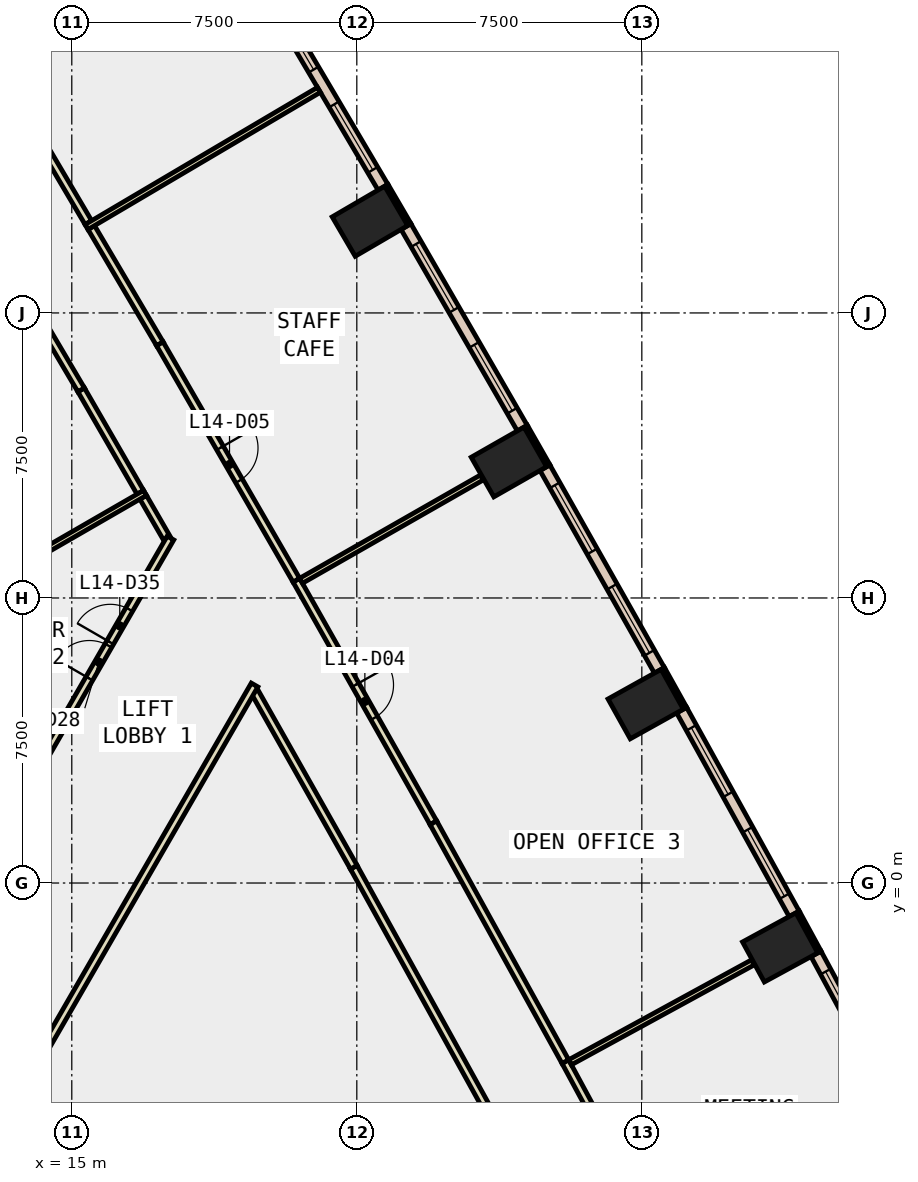
"""IFC4 building model, lengths in metres.
Left out: names, types, materials, properties, quantities, classifications, styles, units other than length and angle.
Written with IfcOpenShell. Run it as: python <this file> out.ifc"""

import sys

from ifc_helpers import new_model, si_unit, direction, frame, frame_2d, origin, origin_2d, place, context, subcontext, project, spatial, rectangle, extrude, element, fill, save


model = new_model("IFC4")
c1 = context("Model", 3, precision=1e-05, world=origin(), true_north=direction((0.0, 1.0)))
c2 = subcontext(c1, "Body", "Model", "MODEL_VIEW")
j1 = project(units=[si_unit("LENGTHUNIT", "METRE"), si_unit("PLANEANGLEUNIT", "RADIAN")], contexts=[c1])
p1 = place(None, origin())
s1 = spatial("IfcSite", under=j1, at=p1, CompositionType="ELEMENT")
p2 = place(p1, origin())
s2 = spatial("IfcBuilding", under=s1, at=p2, CompositionType="ELEMENT")
p3 = place(p2, frame((0.0, 0.0, 68.6)))
s3 = spatial("IfcBuildingStorey", under=s2, at=p3, CompositionType="ELEMENT", Elevation=68.6)
for number, where, z_axis, x_axis in (
    (1, (33.64, -1.695, -0.4), (0.0, 0.0, 1.0), (-0.478, 0.878, 0.0)),
    (2, (30.102, 4.708, -0.4), (0.0, 0.0, 1.0), (-0.487, 0.873, 0.0)),
    (3, (26.503, 11.078, -0.4), (0.0, 0.0, 1.0), (-0.496, 0.869, 0.0)),
    (4, (22.846, 17.413, -0.4), (0.0, 0.0, 1.0), (-0.504, 0.864, 0.0)),
):
    element("IfcColumn", number, at=place(p3, frame(where, z_axis=z_axis, x_axis=x_axis)), inside=s3, PredefinedType="COLUMN", context=c2, shape_type="SweptSolid", body=[
        extrude(rectangle(XDim=1.2, YDim=1.6, at=origin_2d()), origin(), (0.0, 0.0, 1.0), 4.2),
    ])
p4 = place(p3, frame((9.31, -5.375, -0.4), z_axis=(0.0, 0.0, 1.0), x_axis=(0.866017533419, -0.500013631625, 0.0)))
e5 = element("IfcWall", 5, at=p4, inside=s3, PredefinedType="SHEAR", context=c2, shape_type="SweptSolid", body=[
    extrude(rectangle(XDim=9.0, YDim=0.8, at=frame_2d((4.5, 0.0))), origin(), (0.0, 0.0, 1.0), 4.2),
])
p5 = place(p3, frame((34.673, -1.816, 0.0), z_axis=(0.0, 0.0, 1.0), x_axis=(-0.478267644701, 0.878214131082, 0.0)))
e6 = element("IfcWall", 6, at=p5, inside=s3, PredefinedType="STANDARD", context=c2, shape_type="SweptSolid", body=[
    extrude(rectangle(XDim=1.2, YDim=0.1, at=frame_2d((0.6, 0.0))), origin(), (0.0, 0.0, 1.0), 3.8),
])
p6 = place(p3, frame((31.136, 4.598, 0.0), z_axis=(0.0, 0.0, 1.0), x_axis=(-0.486730996044, 0.87355190887, 0.0)))
e7 = element("IfcWall", 7, at=p6, inside=s3, PredefinedType="STANDARD", context=c2, shape_type="SweptSolid", body=[
    extrude(rectangle(XDim=1.2, YDim=0.1, at=frame_2d((0.6, 0.0))), origin(), (0.0, 0.0, 1.0), 3.8),
])
p7 = place(p3, frame((27.539, 10.978, 0.0), z_axis=(0.0, 0.0, 1.0), x_axis=(-0.495854054996, 0.868405870629, 0.0)))
e8 = element("IfcWall", 8, at=p7, inside=s3, PredefinedType="STANDARD", context=c2, shape_type="SweptSolid", body=[
    extrude(rectangle(XDim=1.2, YDim=0.1, at=frame_2d((0.6, 0.0))), origin(), (0.0, 0.0, 1.0), 3.8),
])
p8 = place(p3, frame((23.882, 17.324, 0.0), z_axis=(0.0, 0.0, 1.0), x_axis=(-0.504225229382, 0.863572184623, 0.0)))
e9 = element("IfcWall", 9, at=p8, inside=s3, PredefinedType="STANDARD", context=c2, shape_type="SweptSolid", body=[
    extrude(rectangle(XDim=1.2, YDim=0.1, at=frame_2d((0.6, 0.0))), origin(), (0.0, 0.0, 1.0), 3.8),
])
p9 = place(p3, frame((37.495, -7.253, 0.0), z_axis=(0.0, 0.0, 1.0), x_axis=(-0.475413659872, 0.879762383833, 0.0)))
e10 = element("IfcWall", 10, at=p9, inside=s3, PredefinedType="STANDARD", context=c2, shape_type="SweptSolid", body=[
    extrude(rectangle(XDim=6.125, YDim=0.3, at=frame_2d((3.063, 0.0))), origin(), (0.0, 0.0, 1.0), 3.8),
])
p10 = place(p9, frame((0.531, 0.0, 0.9)))
e11 = element("IfcOpeningElement", 11, at=p10, cuts=e10, PredefinedType="OPENING", context=c2, shape_type="SweptSolid", body=[
    extrude(rectangle(XDim=2.0, YDim=2.6, at=frame_2d((1.0, 1.3))), frame((0.0, 0.16, 0.0), z_axis=(0.0, -1.0, 0.0), x_axis=(1.0, 0.0, 0.0)), (0.0, 0.0, 1.0), 0.32),
])
p11 = place(p9, frame((3.594, 0.0, 0.9)))
e12 = element("IfcOpeningElement", 12, at=p11, cuts=e10, PredefinedType="OPENING", context=c2, shape_type="SweptSolid", body=[
    extrude(rectangle(XDim=2.0, YDim=2.6, at=frame_2d((1.0, 1.3))), frame((0.0, 0.16, 0.0), z_axis=(0.0, -1.0, 0.0), x_axis=(1.0, 0.0, 0.0)), (0.0, 0.0, 1.0), 0.32),
])
p12 = place(p3, frame((34.009, -0.812, 0.0), z_axis=(0.0, 0.0, 1.0), x_axis=(-0.483587271547, 0.875296150339, 0.0)))
e13 = element("IfcWall", 13, at=p12, inside=s3, PredefinedType="STANDARD", context=c2, shape_type="SweptSolid", body=[
    extrude(rectangle(XDim=6.125, YDim=0.3, at=frame_2d((3.062, 0.0))), origin(), (0.0, 0.0, 1.0), 3.8),
])
p13 = place(p12, frame((0.531, 0.0, 0.9)))
e14 = element("IfcOpeningElement", 14, at=p13, cuts=e13, PredefinedType="OPENING", context=c2, shape_type="SweptSolid", body=[
    extrude(rectangle(XDim=2.0, YDim=2.6, at=frame_2d((1.0, 1.3))), frame((0.0, 0.16, 0.0), z_axis=(0.0, -1.0, 0.0), x_axis=(1.0, 0.0, 0.0)), (0.0, 0.0, 1.0), 0.32),
])
p14 = place(p12, frame((3.594, 0.0, 0.9)))
e15 = element("IfcOpeningElement", 15, at=p14, cuts=e13, PredefinedType="OPENING", context=c2, shape_type="SweptSolid", body=[
    extrude(rectangle(XDim=2.0, YDim=2.6, at=frame_2d((1.0, 1.3))), frame((0.0, 0.16, 0.0), z_axis=(0.0, -1.0, 0.0), x_axis=(1.0, 0.0, 0.0)), (0.0, 0.0, 1.0), 0.32),
])
p15 = place(p3, frame((30.462, 5.595, 0.0), z_axis=(0.0, 0.0, 1.0), x_axis=(-0.491887822214, 0.870658584267, 0.0)))
e16 = element("IfcWall", 16, at=p15, inside=s3, PredefinedType="STANDARD", context=c2, shape_type="SweptSolid", body=[
    extrude(rectangle(XDim=6.125, YDim=0.3, at=frame_2d((3.062, 0.0))), origin(), (0.0, 0.0, 1.0), 3.8),
])
p16 = place(p15, frame((0.531, 0.0, 0.9)))
e17 = element("IfcOpeningElement", 17, at=p16, cuts=e16, PredefinedType="OPENING", context=c2, shape_type="SweptSolid", body=[
    extrude(rectangle(XDim=2.0, YDim=2.6, at=frame_2d((1.0, 1.3))), frame((0.0, 0.16, 0.0), z_axis=(0.0, -1.0, 0.0), x_axis=(1.0, 0.0, 0.0)), (0.0, 0.0, 1.0), 0.32),
])
p17 = place(p15, frame((3.594, 0.0, 0.9)))
e18 = element("IfcOpeningElement", 18, at=p17, cuts=e16, PredefinedType="OPENING", context=c2, shape_type="SweptSolid", body=[
    extrude(rectangle(XDim=2.0, YDim=2.6, at=frame_2d((1.0, 1.3))), frame((0.0, 0.16, 0.0), z_axis=(0.0, -1.0, 0.0), x_axis=(1.0, 0.0, 0.0)), (0.0, 0.0, 1.0), 0.32),
])
p18 = place(p3, frame((26.855, 11.968, 0.0), z_axis=(0.0, 0.0, 1.0), x_axis=(-0.499903021601, 0.86608138705, 0.0)))
e19 = element("IfcWall", 19, at=p18, inside=s3, PredefinedType="STANDARD", context=c2, shape_type="SweptSolid", body=[
    extrude(rectangle(XDim=6.125, YDim=0.3, at=frame_2d((3.062, 0.0))), origin(), (0.0, 0.0, 1.0), 3.8),
])
p19 = place(p18, frame((0.531, 0.0, 0.9)))
e20 = element("IfcOpeningElement", 20, at=p19, cuts=e19, PredefinedType="OPENING", context=c2, shape_type="SweptSolid", body=[
    extrude(rectangle(XDim=2.0, YDim=2.6, at=frame_2d((1.0, 1.3))), frame((0.0, 0.16, 0.0), z_axis=(0.0, -1.0, 0.0), x_axis=(1.0, 0.0, 0.0)), (0.0, 0.0, 1.0), 0.32),
])
p20 = place(p18, frame((3.594, 0.0, 0.9)))
e21 = element("IfcOpeningElement", 21, at=p20, cuts=e19, PredefinedType="OPENING", context=c2, shape_type="SweptSolid", body=[
    extrude(rectangle(XDim=2.0, YDim=2.6, at=frame_2d((1.0, 1.3))), frame((0.0, 0.16, 0.0), z_axis=(0.0, -1.0, 0.0), x_axis=(1.0, 0.0, 0.0)), (0.0, 0.0, 1.0), 0.32),
])
p21 = place(p3, frame((23.189, 18.307, 0.0), z_axis=(0.0, 0.0, 1.0), x_axis=(-0.508163938648, 0.861260362177, 0.0)))
e22 = element("IfcWall", 22, at=p21, inside=s3, PredefinedType="STANDARD", context=c2, shape_type="SweptSolid", body=[
    extrude(rectangle(XDim=6.126, YDim=0.3, at=frame_2d((3.063, 0.0))), origin(), (0.0, 0.0, 1.0), 3.8),
])
p22 = place(p21, frame((0.531, 0.0, 0.9)))
e23 = element("IfcOpeningElement", 23, at=p22, cuts=e22, PredefinedType="OPENING", context=c2, shape_type="SweptSolid", body=[
    extrude(rectangle(XDim=2.0, YDim=2.6, at=frame_2d((1.0, 1.3))), frame((0.0, 0.16, 0.0), z_axis=(0.0, -1.0, 0.0), x_axis=(1.0, 0.0, 0.0)), (0.0, 0.0, 1.0), 0.32),
])
p23 = place(p21, frame((3.594, 0.0, 0.9)))
e24 = element("IfcOpeningElement", 24, at=p23, cuts=e22, PredefinedType="OPENING", context=c2, shape_type="SweptSolid", body=[
    extrude(rectangle(XDim=2.0, YDim=2.6, at=frame_2d((1.0, 1.3))), frame((0.0, 0.16, 0.0), z_axis=(0.0, -1.0, 0.0), x_axis=(1.0, 0.0, 0.0)), (0.0, 0.0, 1.0), 0.32),
])
p24 = place(p3, frame((17.497, 9.078, 0.0), z_axis=(0.0, 0.0, 1.0), x_axis=(-0.500126451326, 0.865952384768, 0.0)))
e25 = element("IfcWall", 25, at=p24, inside=s3, PredefinedType="PARTITIONING", context=c2, shape_type="SweptSolid", body=[
    extrude(rectangle(XDim=1.238, YDim=0.2, at=frame_2d((0.619, 0.0))), origin(), (0.0, 0.0, 1.0), 3.8),
])
p25 = place(p3, frame((16.803, 10.28, 0.0), z_axis=(0.0, 0.0, 1.0), x_axis=(-0.499941881293, 0.866058956036, 0.0)))
e26 = element("IfcWall", 26, at=p25, inside=s3, PredefinedType="PARTITIONING", context=c2, shape_type="SweptSolid", body=[
    extrude(rectangle(XDim=3.114, YDim=0.2, at=frame_2d((1.557, 0.0))), origin(), (0.0, 0.0, 1.0), 3.8),
])
p26 = place(p3, frame((15.246, 12.977, 0.0), z_axis=(0.0, 0.0, 1.0), x_axis=(-0.508473864329, 0.861077423519, 0.0)))
e27 = element("IfcWall", 27, at=p26, inside=s3, PredefinedType="PARTITIONING", context=c2, shape_type="SweptSolid", body=[
    extrude(rectangle(XDim=1.9, YDim=0.2, at=frame_2d((0.95, 0.0))), origin(), (0.0, 0.0, 1.0), 3.8),
])
p27 = place(p3, frame((25.918, -5.916, 0.0), z_axis=(0.0, 0.0, 1.0), x_axis=(-0.483612623402, 0.875282143361, 0.0)))
e28 = element("IfcWall", 28, at=p27, inside=s3, PredefinedType="PARTITIONING", context=c2, shape_type="SweptSolid", body=[
    extrude(rectangle(XDim=7.233, YDim=0.2, at=frame_2d((3.617, 0.0))), origin(), (0.0, 0.0, 1.0), 3.8),
])
p28 = place(p3, frame((22.42, 0.415, 0.0), z_axis=(0.0, 0.0, 1.0), x_axis=(-0.491823859571, 0.870694717543, 0.0)))
e29 = element("IfcWall", 29, at=p28, inside=s3, PredefinedType="PARTITIONING", context=c2, shape_type="SweptSolid", body=[
    extrude(rectangle(XDim=5.309, YDim=0.2, at=frame_2d((2.654, 0.0))), origin(), (0.0, 0.0, 1.0), 3.8),
])
p29 = place(p3, frame((27.988, -4.699, 0.0), z_axis=(0.0, 0.0, 1.0), x_axis=(0.475319272717, -0.879813383044, 0.0)))
e30 = element("IfcWall", 30, at=p29, inside=s3, PredefinedType="PARTITIONING", context=c2, shape_type="SweptSolid", body=[
    extrude(rectangle(XDim=7.256, YDim=0.2, at=frame_2d((3.628, 0.0))), origin(), (0.0, 0.0, 1.0), 3.8),
])
p30 = place(p29, frame((3.203, 0.0, 0.0)))
e31 = element("IfcOpeningElement", 31, at=p30, cuts=e30, PredefinedType="OPENING", context=c2, shape_type="SweptSolid", body=[
    extrude(rectangle(XDim=1.0, YDim=2.1, at=frame_2d((0.5, 1.05))), frame((0.0, 0.11, 0.0), z_axis=(0.0, -1.0, 0.0), x_axis=(1.0, 0.0, 0.0)), (0.0, 0.0, 1.0), 0.22),
])
p31 = place(p3, frame((20.909, 7.969, 0.0), z_axis=(0.0, 0.0, 1.0), x_axis=(0.491808171064, -0.870703579225, 0.0)))
e32 = element("IfcWall", 32, at=p31, inside=s3, PredefinedType="PARTITIONING", context=c2, shape_type="SweptSolid", body=[
    extrude(rectangle(XDim=7.332, YDim=0.2, at=frame_2d((3.666, 0.0))), origin(), (0.0, 0.0, 1.0), 3.8),
])
p32 = place(p31, frame((3.166, 0.0, 0.0)))
e33 = element("IfcOpeningElement", 33, at=p32, cuts=e32, PredefinedType="OPENING", context=c2, shape_type="SweptSolid", body=[
    extrude(rectangle(XDim=1.0, YDim=2.1, at=frame_2d((0.5, 1.05))), frame((0.0, 0.11, 0.0), z_axis=(0.0, -1.0, 0.0), x_axis=(1.0, 0.0, 0.0)), (0.0, 0.0, 1.0), 0.22),
])
p33 = place(p3, frame((24.515, 1.585, 0.0), z_axis=(0.0, 0.0, 1.0), x_axis=(0.483629211989, -0.875272977597, 0.0)))
e34 = element("IfcWall", 34, at=p33, inside=s3, PredefinedType="PARTITIONING", context=c2, shape_type="SweptSolid", body=[
    extrude(rectangle(XDim=7.179, YDim=0.2, at=frame_2d((3.59, 0.0))), origin(), (0.0, 0.0, 1.0), 3.8),
])
p34 = place(p3, frame((15.512, 17.248, 0.0), z_axis=(0.0, 0.0, 1.0), x_axis=(0.508178415101, -0.861251820564, 0.0)))
e35 = element("IfcWall", 35, at=p34, inside=s3, PredefinedType="PARTITIONING", context=c2, shape_type="SweptSolid", body=[
    extrude(rectangle(XDim=3.554, YDim=0.2, at=frame_2d((1.777, 0.0))), origin(), (0.0, 0.0, 1.0), 3.8),
])
p35 = place(p3, frame((17.318, 14.187, 0.0), z_axis=(0.0, 0.0, 1.0), x_axis=(0.499986381413, -0.866033266336, 0.0)))
e36 = element("IfcWall", 36, at=p35, inside=s3, PredefinedType="PARTITIONING", context=c2, shape_type="SweptSolid", body=[
    extrude(rectangle(XDim=7.18, YDim=0.2, at=frame_2d((3.59, 0.0))), origin(), (0.0, 0.0, 1.0), 3.8),
])
p36 = place(p35, frame((3.165, 0.0, 0.0)))
e37 = element("IfcOpeningElement", 37, at=p36, cuts=e36, PredefinedType="OPENING", context=c2, shape_type="SweptSolid", body=[
    extrude(rectangle(XDim=1.0, YDim=2.1, at=frame_2d((0.5, 1.05))), frame((0.0, 0.11, 0.0), z_axis=(0.0, -1.0, 0.0), x_axis=(1.0, 0.0, 0.0)), (0.0, 0.0, 1.0), 0.22),
])
p37 = place(p3, frame((13.63, 20.437, 0.0), z_axis=(0.0, 0.0, 1.0), x_axis=(0.508298695021, -0.861180838523, 0.0)))
e38 = element("IfcWall", 38, at=p37, inside=s3, PredefinedType="PARTITIONING", context=c2, shape_type="SweptSolid", body=[
    extrude(rectangle(XDim=3.553, YDim=0.2, at=frame_2d((1.777, 0.0))), origin(), (0.0, 0.0, 1.0), 3.8),
])
p38 = place(p3, frame((11.261, 6.994, 0.0), z_axis=(0.0, 0.0, 1.0), x_axis=(0.866043905515, 0.499967952693, 0.0)))
e39 = element("IfcWall", 39, at=p38, inside=s3, PredefinedType="PARTITIONING", context=c2, shape_type="SweptSolid", body=[
    extrude(rectangle(XDim=6.542, YDim=0.15, at=frame_2d((3.271, 0.0))), origin(), (0.0, 0.0, 1.0), 3.8),
])
p39 = place(p3, frame((13.827, 2.55, 0.0), z_axis=(0.0, 0.0, 1.0), x_axis=(0.500116794417, 0.865957961995, 0.0)))
e40 = element("IfcWall", 40, at=p39, inside=s3, PredefinedType="PARTITIONING", context=c2, shape_type="SweptSolid", body=[
    extrude(rectangle(XDim=7.538, YDim=0.2, at=frame_2d((3.769, 0.0))), origin(), (0.0, 0.0, 1.0), 3.8),
])
p40 = place(p39, frame((3.269, 0.0, 0.0)))
e41 = element("IfcOpeningElement", 41, at=p40, cuts=e40, PredefinedType="OPENING", context=c2, shape_type="SweptSolid", body=[
    extrude(rectangle(XDim=1.0, YDim=2.1, at=frame_2d((0.5, 1.05))), frame((0.0, 0.11, 0.0), z_axis=(0.0, -1.0, 0.0), x_axis=(1.0, 0.0, 0.0)), (0.0, 0.0, 1.0), 0.22),
])
p41 = place(p39, frame((4.369, 0.0, 0.0)))
e42 = element("IfcOpeningElement", 42, at=p41, cuts=e40, PredefinedType="OPENING", context=c2, shape_type="SweptSolid", body=[
    extrude(rectangle(XDim=1.0, YDim=2.1, at=frame_2d((0.5, 1.05))), frame((0.0, 0.11, 0.0), z_axis=(0.0, -1.0, 0.0), x_axis=(1.0, 0.0, 0.0)), (0.0, 0.0, 1.0), 0.22),
])
p42 = place(p3, frame((19.81, 5.211, 0.0), z_axis=(0.0, 0.0, 1.0), x_axis=(-0.500003368273, -0.866023459102, 0.0)))
e43 = element("IfcWall", 43, at=p42, inside=s3, PredefinedType="PARTITIONING", context=c2, shape_type="SweptSolid", body=[
    extrude(rectangle(XDim=14.018, YDim=0.2, at=frame_2d((7.009, 0.0))), origin(), (0.0, 0.0, 1.0), 3.8),
])
p43 = place(p3, frame((28.111, -4.717, 0.0), z_axis=(0.0, 0.0, 1.0), x_axis=(0.877558297547, 0.479469951515, 0.0)))
e44 = element("IfcWall", 44, at=p43, inside=s3, PredefinedType="PARTITIONING", context=c2, shape_type="SweptSolid", body=[
    extrude(rectangle(XDim=5.481, YDim=0.15, at=frame_2d((2.74, 0.0))), origin(), (0.0, 0.0, 1.0), 3.8),
])
p44 = place(p3, frame((21.033, 7.953, 0.0), z_axis=(0.0, 0.0, 1.0), x_axis=(0.868311678357, 0.496018980715, 0.0)))
e45 = element("IfcWall", 45, at=p44, inside=s3, PredefinedType="PARTITIONING", context=c2, shape_type="SweptSolid", body=[
    extrude(rectangle(XDim=5.48, YDim=0.15, at=frame_2d((2.74, 0.0))), origin(), (0.0, 0.0, 1.0), 3.8),
])
p45 = place(p3, frame((15.388, 17.261, 0.0), z_axis=(0.0, 0.0, 1.0), x_axis=(0.861189945173, 0.50828326584, 0.0)))
e46 = element("IfcWall", 46, at=p45, inside=s3, PredefinedType="PARTITIONING", context=c2, shape_type="SweptSolid", body=[
    extrude(rectangle(XDim=7.101, YDim=0.15, at=frame_2d((3.55, 0.0))), origin(), (0.0, 0.0, 1.0), 3.8),
])
p46 = place(p11, origin())
e47 = element("IfcWindow", 47, at=p46, inside=s3, PartitioningType="SINGLE_PANEL", PredefinedType="WINDOW", context=c2, shape_type="SweptSolid", body=[
    extrude(rectangle(XDim=2.0, YDim=2.6, at=frame_2d((1.0, 1.3))), frame((0.0, 0.03, 0.0), z_axis=(0.0, -1.0, 0.0), x_axis=(1.0, 0.0, 0.0)), (0.0, 0.0, 1.0), 0.06),
])
fill(e12, e47)
p47 = place(p13, origin())
e48 = element("IfcWindow", 48, at=p47, inside=s3, PartitioningType="SINGLE_PANEL", PredefinedType="WINDOW", context=c2, shape_type="SweptSolid", body=[
    extrude(rectangle(XDim=2.0, YDim=2.6, at=frame_2d((1.0, 1.3))), frame((0.0, 0.03, 0.0), z_axis=(0.0, -1.0, 0.0), x_axis=(1.0, 0.0, 0.0)), (0.0, 0.0, 1.0), 0.06),
])
fill(e14, e48)
p48 = place(p14, origin())
e49 = element("IfcWindow", 49, at=p48, inside=s3, PartitioningType="SINGLE_PANEL", PredefinedType="WINDOW", context=c2, shape_type="SweptSolid", body=[
    extrude(rectangle(XDim=2.0, YDim=2.6, at=frame_2d((1.0, 1.3))), frame((0.0, 0.03, 0.0), z_axis=(0.0, -1.0, 0.0), x_axis=(1.0, 0.0, 0.0)), (0.0, 0.0, 1.0), 0.06),
])
fill(e15, e49)
p49 = place(p16, origin())
e50 = element("IfcWindow", 50, at=p49, inside=s3, PartitioningType="SINGLE_PANEL", PredefinedType="WINDOW", context=c2, shape_type="SweptSolid", body=[
    extrude(rectangle(XDim=2.0, YDim=2.6, at=frame_2d((1.0, 1.3))), frame((0.0, 0.03, 0.0), z_axis=(0.0, -1.0, 0.0), x_axis=(1.0, 0.0, 0.0)), (0.0, 0.0, 1.0), 0.06),
])
fill(e17, e50)
p50 = place(p17, origin())
e51 = element("IfcWindow", 51, at=p50, inside=s3, PartitioningType="SINGLE_PANEL", PredefinedType="WINDOW", context=c2, shape_type="SweptSolid", body=[
    extrude(rectangle(XDim=2.0, YDim=2.6, at=frame_2d((1.0, 1.3))), frame((0.0, 0.03, 0.0), z_axis=(0.0, -1.0, 0.0), x_axis=(1.0, 0.0, 0.0)), (0.0, 0.0, 1.0), 0.06),
])
fill(e18, e51)
p51 = place(p19, origin())
e52 = element("IfcWindow", 52, at=p51, inside=s3, PartitioningType="SINGLE_PANEL", PredefinedType="WINDOW", context=c2, shape_type="SweptSolid", body=[
    extrude(rectangle(XDim=2.0, YDim=2.6, at=frame_2d((1.0, 1.3))), frame((0.0, 0.03, 0.0), z_axis=(0.0, -1.0, 0.0), x_axis=(1.0, 0.0, 0.0)), (0.0, 0.0, 1.0), 0.06),
])
fill(e20, e52)
p52 = place(p20, origin())
e53 = element("IfcWindow", 53, at=p52, inside=s3, PartitioningType="SINGLE_PANEL", PredefinedType="WINDOW", context=c2, shape_type="SweptSolid", body=[
    extrude(rectangle(XDim=2.0, YDim=2.6, at=frame_2d((1.0, 1.3))), frame((0.0, 0.03, 0.0), z_axis=(0.0, -1.0, 0.0), x_axis=(1.0, 0.0, 0.0)), (0.0, 0.0, 1.0), 0.06),
])
fill(e21, e53)
p53 = place(p22, origin())
e54 = element("IfcWindow", 54, at=p53, inside=s3, PartitioningType="SINGLE_PANEL", PredefinedType="WINDOW", context=c2, shape_type="SweptSolid", body=[
    extrude(rectangle(XDim=2.0, YDim=2.6, at=frame_2d((1.0, 1.3))), frame((0.0, 0.03, 0.0), z_axis=(0.0, -1.0, 0.0), x_axis=(1.0, 0.0, 0.0)), (0.0, 0.0, 1.0), 0.06),
])
fill(e23, e54)
p54 = place(p23, origin())
e55 = element("IfcWindow", 55, at=p54, inside=s3, PartitioningType="SINGLE_PANEL", PredefinedType="WINDOW", context=c2, shape_type="SweptSolid", body=[
    extrude(rectangle(XDim=2.0, YDim=2.6, at=frame_2d((1.0, 1.3))), frame((0.0, 0.03, 0.0), z_axis=(0.0, -1.0, 0.0), x_axis=(1.0, 0.0, 0.0)), (0.0, 0.0, 1.0), 0.06),
])
fill(e24, e55)
p55 = place(p32, origin())
e56 = element("IfcDoor", 56, at=p55, inside=s3, OperationType="SINGLE_SWING_RIGHT", PredefinedType="DOOR", context=c2, shape_type="SweptSolid", body=[
    extrude(rectangle(XDim=1.0, YDim=2.1, at=frame_2d((0.5, 1.05))), frame((0.0, 0.025, 0.0), z_axis=(0.0, -1.0, 0.0), x_axis=(1.0, 0.0, 0.0)), (0.0, 0.0, 1.0), 0.05),
])
fill(e33, e56)
p56 = place(p36, origin())
e57 = element("IfcDoor", 57, at=p56, inside=s3, OperationType="SINGLE_SWING_LEFT", PredefinedType="DOOR", context=c2, shape_type="SweptSolid", body=[
    extrude(rectangle(XDim=1.0, YDim=2.1, at=frame_2d((0.5, 1.05))), frame((0.0, 0.025, 0.0), z_axis=(0.0, -1.0, 0.0), x_axis=(1.0, 0.0, 0.0)), (0.0, 0.0, 1.0), 0.05),
])
fill(e37, e57)
p57 = place(p40, origin())
e58 = element("IfcDoor", 58, at=p57, inside=s3, OperationType="SINGLE_SWING_LEFT", PredefinedType="DOOR", context=c2, shape_type="SweptSolid", body=[
    extrude(rectangle(XDim=1.0, YDim=2.1, at=frame_2d((0.5, 1.05))), frame((0.0, 0.025, 0.0), z_axis=(0.0, -1.0, 0.0), x_axis=(1.0, 0.0, 0.0)), (0.0, 0.0, 1.0), 0.05),
])
fill(e41, e58)
p58 = place(p41, origin())
e59 = element("IfcDoor", 59, at=p58, inside=s3, OperationType="SINGLE_SWING_RIGHT", PredefinedType="DOOR", context=c2, shape_type="SweptSolid", body=[
    extrude(rectangle(XDim=1.0, YDim=2.1, at=frame_2d((0.5, 1.05))), frame((0.0, 0.025, 0.0), z_axis=(0.0, -1.0, 0.0), x_axis=(1.0, 0.0, 0.0)), (0.0, 0.0, 1.0), 0.05),
])
fill(e42, e59)
save(model, sys.argv[1])
